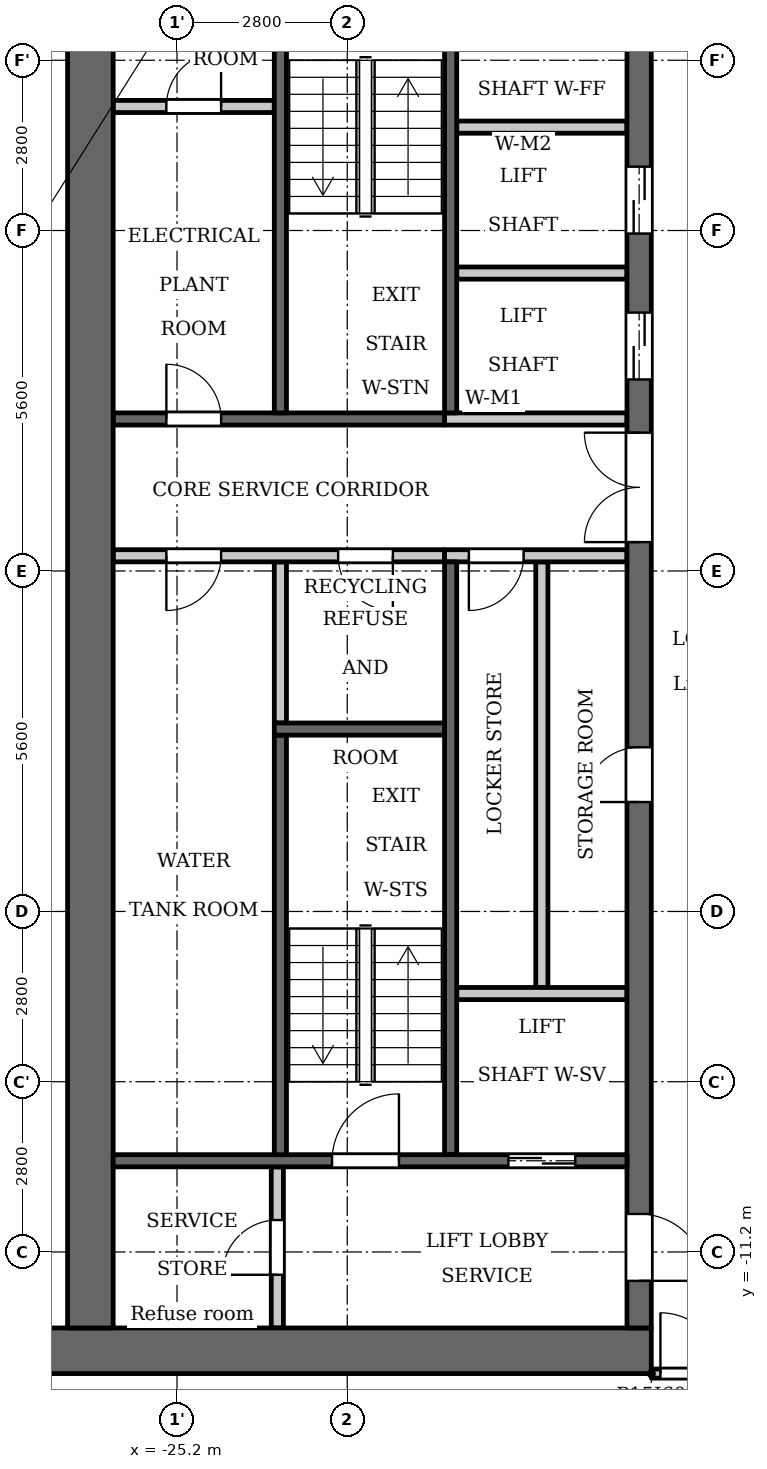
"""IFC4 building model, lengths in metres.
Left out: names, types, materials, properties, quantities, classifications, styles, units other than length and angle.
Written with IfcOpenShell. Run it as: python <this file> out.ifc"""

import sys

from ifc_helpers import new_model, si_unit, direction, frame, frame_2d, origin, place, context, subcontext, project, spatial, rectangle, extrude, element, fill, save


model = new_model("IFC4")
c1 = context("Model", 3, precision=1e-05, world=origin(), true_north=direction((0.0, 1.0)))
c2 = subcontext(c1, "Body", "Model", "MODEL_VIEW")
j1 = project(units=[si_unit("LENGTHUNIT", "METRE"), si_unit("PLANEANGLEUNIT", "RADIAN")], contexts=[c1])
p1 = place(None, origin())
s1 = spatial("IfcSite", under=j1, at=p1, CompositionType="ELEMENT")
p2 = place(p1, origin())
s2 = spatial("IfcBuilding", under=s1, at=p2, CompositionType="ELEMENT")
p3 = place(p2, frame((0.0, 0.0, 143.1)))
s3 = spatial("IfcBuildingStorey", under=s2, at=p3, CompositionType="ELEMENT", Elevation=143.1)
p4 = place(p3, frame((-23.5, -2.5, 0.0), z_axis=(0.0, 0.0, 1.0), x_axis=(0.0, 1.0, 0.0)))
e1 = element("IfcWall", 1, at=p4, inside=s3, PredefinedType="PARTITIONING", context=c2, shape_type="SweptSolid", body=[
    extrude(rectangle(XDim=2.65, YDim=0.2, at=frame_2d((1.325, 0.0))), origin(), (0.0, 0.0, 1.0), 3.2),
])
p5 = place(p3, frame((-20.7, 2.6, 0.0), z_axis=(0.0, 0.0, 1.0), x_axis=(0.0, 1.0, 0.0)))
e2 = element("IfcWall", 2, at=p5, inside=s3, PredefinedType="SHEAR", context=c2, shape_type="SweptSolid", body=[
    extrude(rectangle(XDim=7.0, YDim=0.2, at=frame_2d((3.5, 0.0))), origin(), (0.0, 0.0, 1.0), 3.2),
])
p6 = place(p3, frame((-20.7, -9.6, 0.0), z_axis=(0.0, 0.0, 1.0), x_axis=(0.0, 1.0, 0.0)))
e3 = element("IfcWall", 3, at=p6, inside=s3, PredefinedType="SHEAR", context=c2, shape_type="SweptSolid", body=[
    extrude(rectangle(XDim=9.75, YDim=0.2, at=frame_2d((4.875, 0.0))), origin(), (0.0, 0.0, 1.0), 3.2),
])
p7 = place(p3, frame((-20.8, 2.5, 0.0), z_axis=(0.0, 0.0, 1.0), x_axis=(-1.0, 0.0, 0.0)))
e4 = element("IfcWall", 4, at=p7, inside=s3, PredefinedType="SHEAR", context=c2, shape_type="SweptSolid", body=[
    extrude(rectangle(XDim=5.45, YDim=0.2, at=frame_2d((2.725, 0.0))), origin(), (0.0, 0.0, 1.0), 3.2),
])
p8 = place(p7, frame((3.675, 0.0, 0.0)))
e5 = element("IfcOpeningElement", 5, at=p8, cuts=e4, PredefinedType="OPENING", context=c2, shape_type="SweptSolid", body=[
    extrude(rectangle(XDim=0.9, YDim=2.1, at=frame_2d((0.45, 1.05))), frame((0.0, 0.11, 0.0), z_axis=(0.0, -1.0, 0.0), x_axis=(1.0, 0.0, 0.0)), (0.0, 0.0, 1.0), 0.22),
])
p9 = place(p3, frame((-20.8, 0.25, 0.0), z_axis=(0.0, 0.0, 1.0), x_axis=(-1.0, 0.0, 0.0)))
e6 = element("IfcWall", 6, at=p9, inside=s3, PredefinedType="PARTITIONING", context=c2, shape_type="SweptSolid", body=[
    extrude(rectangle(XDim=5.45, YDim=0.2, at=frame_2d((2.725, 0.0))), origin(), (0.0, 0.0, 1.0), 3.2),
])
p10 = place(p9, frame((0.85, 0.0, 0.0)))
e7 = element("IfcOpeningElement", 7, at=p10, cuts=e6, PredefinedType="OPENING", context=c2, shape_type="SweptSolid", body=[
    extrude(rectangle(XDim=0.9, YDim=2.1, at=frame_2d((0.45, 1.05))), frame((0.0, 0.11, 0.0), z_axis=(0.0, -1.0, 0.0), x_axis=(1.0, 0.0, 0.0)), (0.0, 0.0, 1.0), 0.22),
])
p11 = place(p9, frame((3.675, 0.0, 0.0)))
e8 = element("IfcOpeningElement", 8, at=p11, cuts=e6, PredefinedType="OPENING", context=c2, shape_type="SweptSolid", body=[
    extrude(rectangle(XDim=0.9, YDim=2.1, at=frame_2d((0.45, 1.05))), frame((0.0, 0.11, 0.0), z_axis=(0.0, -1.0, 0.0), x_axis=(1.0, 0.0, 0.0)), (0.0, 0.0, 1.0), 0.22),
])
p12 = place(p3, frame((-17.4, -12.825, 0.0), z_axis=(0.0, 0.0, 1.0), x_axis=(-1.0, 0.0, 0.0)))
e9 = element("IfcWall", 9, at=p12, inside=s3, PredefinedType="SHEAR", context=c2, shape_type="SweptSolid", body=[
    extrude(rectangle(XDim=10.4, YDim=0.75, at=frame_2d((5.2, 0.0))), origin(), (0.0, 0.0, 1.0), 3.2),
])
p13 = place(p3, frame((-19.2, -6.85, 0.0), z_axis=(0.0, 0.0, 1.0), x_axis=(0.0, 1.0, 0.0)))
e10 = element("IfcWall", 10, at=p13, inside=s3, PredefinedType="PARTITIONING", context=c2, shape_type="SweptSolid", body=[
    extrude(rectangle(XDim=7.0, YDim=0.2, at=frame_2d((3.5, 0.0))), origin(), (0.0, 0.0, 1.0), 3.2),
])
p14 = place(p3, frame((-17.6, -12.45, 0.0), z_axis=(0.0, 0.0, 1.0), x_axis=(0.0, 1.0, 0.0)))
e11 = element("IfcWall", 11, at=p14, inside=s3, PredefinedType="SHEAR", context=c2, shape_type="SweptSolid", body=[
    extrude(rectangle(XDim=24.9, YDim=0.4, at=frame_2d((12.45, 0.0))), origin(), (0.0, 0.0, 1.0), 3.2),
])
p15 = place(p14, frame((8.65, 0.0, 0.0)))
e12 = element("IfcOpeningElement", 12, at=p15, cuts=e11, PredefinedType="OPENING", context=c2, shape_type="SweptSolid", body=[
    extrude(rectangle(XDim=0.9, YDim=2.1, at=frame_2d((0.45, 1.05))), frame((0.0, 0.21, 0.0), z_axis=(0.0, -1.0, 0.0), x_axis=(1.0, 0.0, 0.0)), (0.0, 0.0, 1.0), 0.42),
])
p16 = place(p14, frame((15.6, 0.0, 0.0)))
e13 = element("IfcOpeningElement", 13, at=p16, cuts=e11, PredefinedType="OPENING", context=c2, shape_type="SweptSolid", body=[
    extrude(rectangle(XDim=1.1, YDim=2.1, at=frame_2d((0.55, 1.05))), frame((0.0, 0.21, 0.0), z_axis=(0.0, -1.0, 0.0), x_axis=(1.0, 0.0, 0.0)), (0.0, 0.0, 1.0), 0.42),
])
p17 = place(p14, frame((18.0, 0.0, 0.0)))
e14 = element("IfcOpeningElement", 14, at=p17, cuts=e11, PredefinedType="OPENING", context=c2, shape_type="SweptSolid", body=[
    extrude(rectangle(XDim=1.1, YDim=2.1, at=frame_2d((0.55, 1.05))), frame((0.0, 0.21, 0.0), z_axis=(0.0, -1.0, 0.0), x_axis=(1.0, 0.0, 0.0)), (0.0, 0.0, 1.0), 0.42),
])
p18 = place(p14, frame((23.025, 0.0, 0.0)))
e15 = element("IfcOpeningElement", 15, at=p18, cuts=e11, PredefinedType="OPENING", context=c2, shape_type="SweptSolid", body=[
    extrude(rectangle(XDim=1.1, YDim=2.1, at=frame_2d((0.55, 1.05))), frame((0.0, 0.21, 0.0), z_axis=(0.0, -1.0, 0.0), x_axis=(1.0, 0.0, 0.0)), (0.0, 0.0, 1.0), 0.42),
])
p19 = place(p14, frame((0.775, 0.0, 0.0)))
e16 = element("IfcOpeningElement", 16, at=p19, cuts=e11, PredefinedType="OPENING", context=c2, shape_type="SweptSolid", body=[
    extrude(rectangle(XDim=1.1, YDim=2.1, at=frame_2d((0.55, 1.05))), frame((0.0, 0.21, 0.0), z_axis=(0.0, -1.0, 0.0), x_axis=(1.0, 0.0, 0.0)), (0.0, 0.0, 1.0), 0.42),
])
p20 = place(p14, frame((12.925, 0.0, 0.0)))
e17 = element("IfcOpeningElement", 17, at=p20, cuts=e11, PredefinedType="OPENING", context=c2, shape_type="SweptSolid", body=[
    extrude(rectangle(XDim=1.8, YDim=2.1, at=frame_2d((0.9, 1.05))), frame((0.0, 0.21, 0.0), z_axis=(0.0, -1.0, 0.0), x_axis=(1.0, 0.0, 0.0)), (0.0, 0.0, 1.0), 0.42),
])
p21 = place(p3, frame((-26.625, -12.45, 0.0), z_axis=(0.0, 0.0, 1.0), x_axis=(0.0, 1.0, 0.0)))
e18 = element("IfcWall", 18, at=p21, inside=s3, PredefinedType="SHEAR", context=c2, shape_type="SweptSolid", body=[
    extrude(rectangle(XDim=24.9, YDim=0.75, at=frame_2d((12.45, 0.0))), origin(), (0.0, 0.0, 1.0), 3.2),
])
p22 = place(p3, frame((-23.55, -12.45, 0.0), z_axis=(0.0, 0.0, 1.0), x_axis=(0.0, 1.0, 0.0)))
e19 = element("IfcWall", 19, at=p22, inside=s3, PredefinedType="PARTITIONING", context=c2, shape_type="SweptSolid", body=[
    extrude(rectangle(XDim=2.65, YDim=0.2, at=frame_2d((1.325, 0.0))), origin(), (0.0, 0.0, 1.0), 3.2),
])
p23 = place(p22, frame((0.875, 0.0, 0.0)))
e20 = element("IfcOpeningElement", 20, at=p23, cuts=e19, PredefinedType="OPENING", context=c2, shape_type="SweptSolid", body=[
    extrude(rectangle(XDim=0.9, YDim=2.1, at=frame_2d((0.45, 1.05))), frame((0.0, 0.11, 0.0), z_axis=(0.0, -1.0, 0.0), x_axis=(1.0, 0.0, 0.0)), (0.0, 0.0, 1.0), 0.22),
])
p24 = place(p3, frame((-23.6, 7.64, 0.0), z_axis=(0.0, 0.0, 1.0), x_axis=(-1.0, 0.0, 0.0)))
e21 = element("IfcWall", 21, at=p24, inside=s3, PredefinedType="PARTITIONING", context=c2, shape_type="SweptSolid", body=[
    extrude(rectangle(XDim=2.65, YDim=0.2, at=frame_2d((1.325, 0.0))), origin(), (0.0, 0.0, 1.0), 3.2),
])
p25 = place(p24, frame((0.875, 0.0, 0.0)))
e22 = element("IfcOpeningElement", 22, at=p25, cuts=e21, PredefinedType="OPENING", context=c2, shape_type="SweptSolid", body=[
    extrude(rectangle(XDim=0.9, YDim=2.1, at=frame_2d((0.45, 1.05))), frame((0.0, 0.11, 0.0), z_axis=(0.0, -1.0, 0.0), x_axis=(1.0, 0.0, 0.0)), (0.0, 0.0, 1.0), 0.22),
])
p26 = place(p3, frame((-17.8, -9.7, 0.0), z_axis=(0.0, 0.0, 1.0), x_axis=(-1.0, 0.0, 0.0)))
e23 = element("IfcWall", 23, at=p26, inside=s3, PredefinedType="SHEAR", context=c2, shape_type="SweptSolid", body=[
    extrude(rectangle(XDim=8.45, YDim=0.2, at=frame_2d((4.225, 0.0))), origin(), (0.0, 0.0, 1.0), 3.2),
])
p27 = place(p26, frame((0.85, 0.0, 0.0)))
e24 = element("IfcOpeningElement", 24, at=p27, cuts=e23, PredefinedType="OPENING", context=c2, shape_type="SweptSolid", body=[
    extrude(rectangle(XDim=1.1, YDim=2.1, at=frame_2d((0.55, 1.05))), frame((0.0, 0.11, 0.0), z_axis=(0.0, -1.0, 0.0), x_axis=(1.0, 0.0, 0.0)), (0.0, 0.0, 1.0), 0.22),
])
p28 = place(p26, frame((3.75, 0.0, 0.0)))
e25 = element("IfcOpeningElement", 25, at=p28, cuts=e23, PredefinedType="OPENING", context=c2, shape_type="SweptSolid", body=[
    extrude(rectangle(XDim=1.1, YDim=2.1, at=frame_2d((0.55, 1.05))), frame((0.0, 0.11, 0.0), z_axis=(0.0, -1.0, 0.0), x_axis=(1.0, 0.0, 0.0)), (0.0, 0.0, 1.0), 0.22),
])
p29 = place(p3, frame((-17.8, -6.95, 0.0), z_axis=(0.0, 0.0, 1.0), x_axis=(-1.0, 0.0, 0.0)))
e26 = element("IfcWall", 26, at=p29, inside=s3, PredefinedType="PARTITIONING", context=c2, shape_type="SweptSolid", body=[
    extrude(rectangle(XDim=2.8, YDim=0.2, at=frame_2d((1.4, 0.0))), origin(), (0.0, 0.0, 1.0), 3.2),
])
p30 = place(p3, frame((-17.8, 0.25, 0.0), z_axis=(0.0, 0.0, 1.0), x_axis=(-1.0, 0.0, 0.0)))
e27 = element("IfcWall", 27, at=p30, inside=s3, PredefinedType="PARTITIONING", context=c2, shape_type="SweptSolid", body=[
    extrude(rectangle(XDim=3.0, YDim=0.2, at=frame_2d((1.5, 0.0))), origin(), (0.0, 0.0, 1.0), 3.2),
])
p31 = place(p30, frame((1.7, 0.0, 0.0)))
e28 = element("IfcOpeningElement", 28, at=p31, cuts=e27, PredefinedType="OPENING", context=c2, shape_type="SweptSolid", body=[
    extrude(rectangle(XDim=0.9, YDim=2.1, at=frame_2d((0.45, 1.05))), frame((0.0, 0.11, 0.0), z_axis=(0.0, -1.0, 0.0), x_axis=(1.0, 0.0, 0.0)), (0.0, 0.0, 1.0), 0.22),
])
p32 = place(p3, frame((-17.8, 2.5, 0.0), z_axis=(0.0, 0.0, 1.0), x_axis=(-1.0, 0.0, 0.0)))
e29 = element("IfcWall", 29, at=p32, inside=s3, PredefinedType="PARTITIONING", context=c2, shape_type="SweptSolid", body=[
    extrude(rectangle(XDim=3.0, YDim=0.2, at=frame_2d((1.5, 0.0))), origin(), (0.0, 0.0, 1.0), 3.2),
])
for number, where, z_axis, x_axis in (
    (30, (-17.8, 4.9, 0.0), (0.0, 0.0, 1.0), (-1.0, 0.0, 0.0)),
    (31, (-17.8, 7.3, 0.0), (0.0, 0.0, 1.0), (-1.0, 0.0, 0.0)),
):
    element("IfcWall", number, at=place(p3, frame(where, z_axis=z_axis, x_axis=x_axis)), inside=s3, PredefinedType="PARTITIONING", context=c2, shape_type="SweptSolid", body=[
        extrude(rectangle(XDim=2.8, YDim=0.2, at=frame_2d((1.4, 0.0))), origin(), (0.0, 0.0, 1.0), 3.2),
    ])
p33 = place(p3, frame((-23.5, 2.6, 0.0), z_axis=(0.0, 0.0, 1.0), x_axis=(0.0, 1.0, 0.0)))
e32 = element("IfcWall", 32, at=p33, inside=s3, PredefinedType="SHEAR", context=c2, shape_type="SweptSolid", body=[
    extrude(rectangle(XDim=7.0, YDim=0.2, at=frame_2d((3.5, 0.0))), origin(), (0.0, 0.0, 1.0), 3.2),
])
p34 = place(p3, frame((-23.5, -9.6, 0.0), z_axis=(0.0, 0.0, 1.0), x_axis=(0.0, 1.0, 0.0)))
e33 = element("IfcWall", 33, at=p34, inside=s3, PredefinedType="SHEAR", context=c2, shape_type="SweptSolid", body=[
    extrude(rectangle(XDim=6.9, YDim=0.2, at=frame_2d((3.45, 0.0))), origin(), (0.0, 0.0, 1.0), 3.2),
])
p35 = place(p3, frame((-20.8, -2.6, 0.0), z_axis=(0.0, 0.0, 1.0), x_axis=(-1.0, 0.0, 0.0)))
e34 = element("IfcWall", 34, at=p35, inside=s3, PredefinedType="SHEAR", context=c2, shape_type="SweptSolid", body=[
    extrude(rectangle(XDim=2.8, YDim=0.2, at=frame_2d((1.4, 0.0))), origin(), (0.0, 0.0, 1.0), 3.2),
])
p36 = place(p3, frame((-17.4, -13.2, 0.0), z_axis=(0.0, 0.0, 1.0), x_axis=(1.0, 0.0, 0.0)))
e35 = element("IfcWall", 35, at=p36, inside=s3, PredefinedType="PARTITIONING", context=c2, shape_type="SweptSolid", body=[
    extrude(rectangle(XDim=34.8, YDim=0.15, at=frame_2d((17.4, 0.0))), origin(), (0.0, 0.0, 1.0), 3.2),
])
p37 = place(p36, frame((0.15, 0.0, 0.0)))
e36 = element("IfcOpeningElement", 36, at=p37, cuts=e35, PredefinedType="OPENING", context=c2, shape_type="SweptSolid", body=[
    extrude(rectangle(XDim=1.0, YDim=2.1, at=frame_2d((0.5, 1.05))), frame((0.0, 0.085, 0.0), z_axis=(0.0, -1.0, 0.0), x_axis=(1.0, 0.0, 0.0)), (0.0, 0.0, 1.0), 0.17),
])
p38 = place(p36, frame((33.55, 0.0, 0.0)))
e37 = element("IfcOpeningElement", 37, at=p38, cuts=e35, PredefinedType="OPENING", context=c2, shape_type="SweptSolid", body=[
    extrude(rectangle(XDim=1.0, YDim=2.1, at=frame_2d((0.5, 1.05))), frame((0.0, 0.085, 0.0), z_axis=(0.0, -1.0, 0.0), x_axis=(1.0, 0.0, 0.0)), (0.0, 0.0, 1.0), 0.17),
])
p39 = place(p36, frame((6.85, 0.0, 0.0)))
e38 = element("IfcOpeningElement", 38, at=p39, cuts=e35, PredefinedType="OPENING", context=c2, shape_type="SweptSolid", body=[
    extrude(rectangle(XDim=1.0, YDim=2.1, at=frame_2d((0.5, 1.05))), frame((0.0, 0.085, 0.0), z_axis=(0.0, -1.0, 0.0), x_axis=(1.0, 0.0, 0.0)), (0.0, 0.0, 1.0), 0.17),
])
p40 = place(p36, frame((12.45, 0.0, 0.0)))
e39 = element("IfcOpeningElement", 39, at=p40, cuts=e35, PredefinedType="OPENING", context=c2, shape_type="SweptSolid", body=[
    extrude(rectangle(XDim=1.0, YDim=2.1, at=frame_2d((0.5, 1.05))), frame((0.0, 0.085, 0.0), z_axis=(0.0, -1.0, 0.0), x_axis=(1.0, 0.0, 0.0)), (0.0, 0.0, 1.0), 0.17),
])
p41 = place(p36, frame((21.3, 0.0, 0.0)))
e40 = element("IfcOpeningElement", 40, at=p41, cuts=e35, PredefinedType="OPENING", context=c2, shape_type="SweptSolid", body=[
    extrude(rectangle(XDim=1.0, YDim=2.1, at=frame_2d((0.5, 1.05))), frame((0.0, 0.085, 0.0), z_axis=(0.0, -1.0, 0.0), x_axis=(1.0, 0.0, 0.0)), (0.0, 0.0, 1.0), 0.17),
])
p42 = place(p36, frame((26.9, 0.0, 0.0)))
e41 = element("IfcOpeningElement", 41, at=p42, cuts=e35, PredefinedType="OPENING", context=c2, shape_type="SweptSolid", body=[
    extrude(rectangle(XDim=1.0, YDim=2.1, at=frame_2d((0.5, 1.05))), frame((0.0, 0.085, 0.0), z_axis=(0.0, -1.0, 0.0), x_axis=(1.0, 0.0, 0.0)), (0.0, 0.0, 1.0), 0.17),
])
p43 = place(p27, origin())
e42 = element("IfcDoor", 42, at=p43, inside=s3, OperationType="DOUBLE_DOOR_SLIDING", PredefinedType="DOOR", context=c2, shape_type="SweptSolid", body=[
    extrude(rectangle(XDim=1.1, YDim=2.1, at=frame_2d((0.55, 1.05))), frame((0.0, 0.025, 0.0), z_axis=(0.0, -1.0, 0.0), x_axis=(1.0, 0.0, 0.0)), (0.0, 0.0, 1.0), 0.05),
])
fill(e24, e42)
p44 = place(p15, origin())
e43 = element("IfcDoor", 43, at=p44, inside=s3, OperationType="SINGLE_SWING_RIGHT", PredefinedType="DOOR", context=c2, shape_type="SweptSolid", body=[
    extrude(rectangle(XDim=0.9, YDim=2.1, at=frame_2d((0.45, 1.05))), frame((0.0, 0.025, 0.0), z_axis=(0.0, -1.0, 0.0), x_axis=(1.0, 0.0, 0.0)), (0.0, 0.0, 1.0), 0.05),
])
fill(e12, e43)
p45 = place(p31, origin())
e44 = element("IfcDoor", 44, at=p45, inside=s3, OperationType="SINGLE_SWING_LEFT", PredefinedType="DOOR", context=c2, shape_type="SweptSolid", body=[
    extrude(rectangle(XDim=0.9, YDim=2.1, at=frame_2d((0.45, 1.05))), frame((0.0, 0.025, 0.0), z_axis=(0.0, -1.0, 0.0), x_axis=(1.0, 0.0, 0.0)), (0.0, 0.0, 1.0), 0.05),
])
fill(e28, e44)
p46 = place(p16, origin())
e45 = element("IfcDoor", 45, at=p46, inside=s3, OperationType="DOUBLE_DOOR_SLIDING", PredefinedType="DOOR", context=c2, shape_type="SweptSolid", body=[
    extrude(rectangle(XDim=1.1, YDim=2.1, at=frame_2d((0.55, 1.05))), frame((0.0, 0.025, 0.0), z_axis=(0.0, -1.0, 0.0), x_axis=(1.0, 0.0, 0.0)), (0.0, 0.0, 1.0), 0.05),
])
fill(e13, e45)
p47 = place(p17, origin())
e46 = element("IfcDoor", 46, at=p47, inside=s3, OperationType="DOUBLE_DOOR_SLIDING", PredefinedType="DOOR", context=c2, shape_type="SweptSolid", body=[
    extrude(rectangle(XDim=1.1, YDim=2.1, at=frame_2d((0.55, 1.05))), frame((0.0, 0.025, 0.0), z_axis=(0.0, -1.0, 0.0), x_axis=(1.0, 0.0, 0.0)), (0.0, 0.0, 1.0), 0.05),
])
fill(e14, e46)
p48 = place(p19, origin())
e47 = element("IfcDoor", 47, at=p48, inside=s3, OperationType="SINGLE_SWING_LEFT", PredefinedType="DOOR", context=c2, shape_type="SweptSolid", body=[
    extrude(rectangle(XDim=1.1, YDim=2.1, at=frame_2d((0.55, 1.05))), frame((0.0, 0.025, 0.0), z_axis=(0.0, -1.0, 0.0), x_axis=(1.0, 0.0, 0.0)), (0.0, 0.0, 1.0), 0.05),
])
fill(e16, e47)
p49 = place(p23, origin())
e48 = element("IfcDoor", 48, at=p49, inside=s3, OperationType="SINGLE_SWING_RIGHT", PredefinedType="DOOR", context=c2, shape_type="SweptSolid", body=[
    extrude(rectangle(XDim=0.9, YDim=2.1, at=frame_2d((0.45, 1.05))), frame((0.0, 0.025, 0.0), z_axis=(0.0, -1.0, 0.0), x_axis=(1.0, 0.0, 0.0)), (0.0, 0.0, 1.0), 0.05),
])
fill(e20, e48)
p50 = place(p28, origin())
e49 = element("IfcDoor", 49, at=p50, inside=s3, OperationType="SINGLE_SWING_LEFT", PredefinedType="DOOR", context=c2, shape_type="SweptSolid", body=[
    extrude(rectangle(XDim=1.1, YDim=2.1, at=frame_2d((0.55, 1.05))), frame((0.0, 0.025, 0.0), z_axis=(0.0, -1.0, 0.0), x_axis=(1.0, 0.0, 0.0)), (0.0, 0.0, 1.0), 0.05),
])
fill(e25, e49)
p51 = place(p20, origin())
e50 = element("IfcDoor", 50, at=p51, inside=s3, OperationType="DOUBLE_DOOR_SINGLE_SWING", PredefinedType="DOOR", context=c2, shape_type="SweptSolid", body=[
    extrude(rectangle(XDim=1.8, YDim=2.1, at=frame_2d((0.9, 1.05))), frame((0.0, 0.025, 0.0), z_axis=(0.0, -1.0, 0.0), x_axis=(1.0, 0.0, 0.0)), (0.0, 0.0, 1.0), 0.05),
])
fill(e17, e50)
p52 = place(p10, origin())
e51 = element("IfcDoor", 51, at=p52, inside=s3, OperationType="SINGLE_SWING_RIGHT", PredefinedType="DOOR", context=c2, shape_type="SweptSolid", body=[
    extrude(rectangle(XDim=0.9, YDim=2.1, at=frame_2d((0.45, 1.05))), frame((0.0, 0.025, 0.0), z_axis=(0.0, -1.0, 0.0), x_axis=(1.0, 0.0, 0.0)), (0.0, 0.0, 1.0), 0.05),
])
fill(e7, e51)
p53 = place(p11, origin())
e52 = element("IfcDoor", 52, at=p53, inside=s3, OperationType="SINGLE_SWING_LEFT", PredefinedType="DOOR", context=c2, shape_type="SweptSolid", body=[
    extrude(rectangle(XDim=0.9, YDim=2.1, at=frame_2d((0.45, 1.05))), frame((0.0, 0.025, 0.0), z_axis=(0.0, -1.0, 0.0), x_axis=(1.0, 0.0, 0.0)), (0.0, 0.0, 1.0), 0.05),
])
fill(e8, e52)
p54 = place(p25, origin())
e53 = element("IfcDoor", 53, at=p54, inside=s3, OperationType="SINGLE_SWING_LEFT", PredefinedType="DOOR", context=c2, shape_type="SweptSolid", body=[
    extrude(rectangle(XDim=0.9, YDim=2.1, at=frame_2d((0.45, 1.05))), frame((0.0, 0.025, 0.0), z_axis=(0.0, -1.0, 0.0), x_axis=(1.0, 0.0, 0.0)), (0.0, 0.0, 1.0), 0.05),
])
fill(e22, e53)
p55 = place(p8, origin())
e54 = element("IfcDoor", 54, at=p55, inside=s3, OperationType="SINGLE_SWING_RIGHT", PredefinedType="DOOR", context=c2, shape_type="SweptSolid", body=[
    extrude(rectangle(XDim=0.9, YDim=2.1, at=frame_2d((0.45, 1.05))), frame((0.0, 0.025, 0.0), z_axis=(0.0, -1.0, 0.0), x_axis=(1.0, 0.0, 0.0)), (0.0, 0.0, 1.0), 0.05),
])
fill(e5, e54)
p56 = place(p37, origin())
e55 = element("IfcDoor", 55, at=p56, inside=s3, OperationType="SINGLE_SWING_RIGHT", PredefinedType="DOOR", context=c2, shape_type="SweptSolid", body=[
    extrude(rectangle(XDim=1.0, YDim=2.1, at=frame_2d((0.5, 1.05))), frame((0.0, 0.025, 0.0), z_axis=(0.0, -1.0, 0.0), x_axis=(1.0, 0.0, 0.0)), (0.0, 0.0, 1.0), 0.05),
])
fill(e36, e55)
save(model, sys.argv[1])
